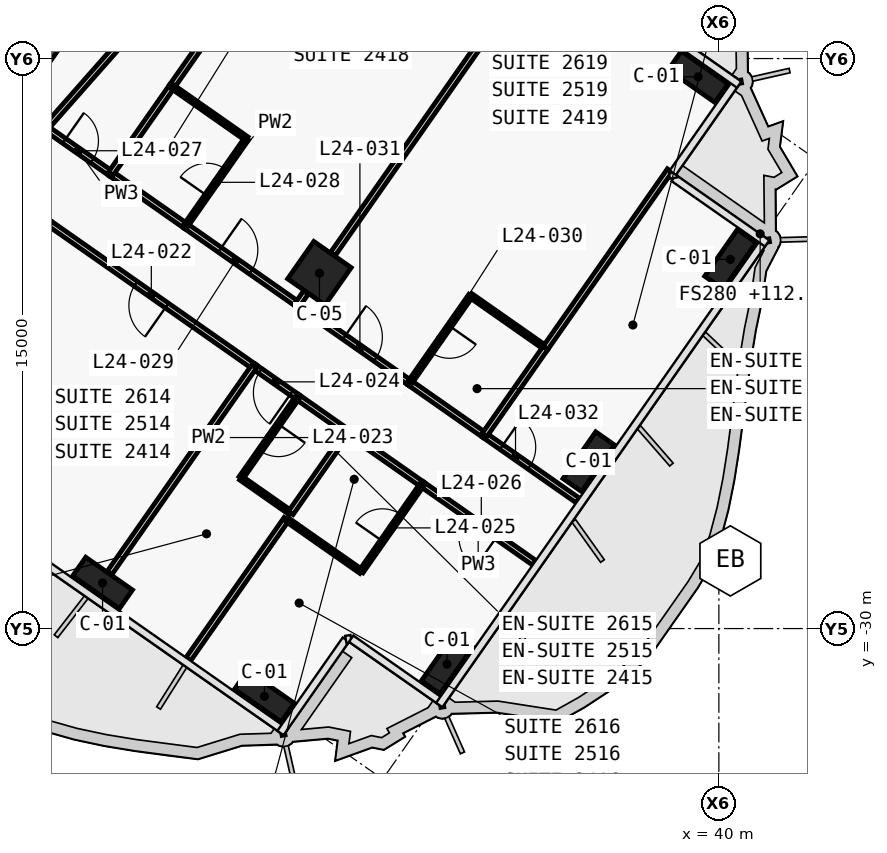
"""IFC4 building model, lengths in metres.
Left out: names, types, materials, properties, quantities, classifications, styles, units other than length and angle.
Written with IfcOpenShell. Run it as: python <this file> out.ifc"""

import sys

from ifc_helpers import new_model, si_unit, direction, frame, frame_2d, origin, origin_2d, place, context, subcontext, project, spatial, polyline, rectangle, outline, extrude, element, fill, save


model = new_model("IFC4")
c1 = context("Model", 3, precision=1e-05, world=origin(), true_north=direction((0.0, 1.0)))
c2 = subcontext(c1, "Body", "Model", "MODEL_VIEW")
j1 = project(units=[si_unit("LENGTHUNIT", "METRE"), si_unit("PLANEANGLEUNIT", "RADIAN")], contexts=[c1])
p1 = place(None, origin())
s1 = spatial("IfcSite", under=j1, at=p1, CompositionType="ELEMENT")
p2 = place(p1, origin())
s2 = spatial("IfcBuilding", under=s1, at=p2, CompositionType="ELEMENT")
p3 = place(p2, frame((0.0, 0.0, 112.1)))
s3 = spatial("IfcBuildingStorey", under=s2, at=p3, CompositionType="ELEMENT", Elevation=112.1)
p4 = place(p3, frame((21.708, -15.2, 0.0), z_axis=(0.0, 0.0, 1.0), x_axis=(0.573576324356, 0.819152122709, 0.0)))
e1 = element("IfcWall", 1, at=p4, inside=s3, PredefinedType="SHEAR", context=c2, shape_type="SweptSolid", body=[
    extrude(outline(polyline([(9.2, 0.5), (0.0, 0.5), (0.0, -0.5), (9.2, -0.5), (9.2, 0.5)])), origin(), (0.0, 0.0, 1.0), 3.6),
])
p5 = place(p4, frame((6.1, 0.0, 0.0)))
e2 = element("IfcOpeningElement", 2, at=p5, cuts=e1, PredefinedType="OPENING", context=c2, shape_type="SweptSolid", body=[
    extrude(rectangle(XDim=1.8, YDim=2.1, at=frame_2d((0.9, 1.05))), frame((0.0, 0.51, 0.0), z_axis=(0.0, -1.0, 0.0), x_axis=(1.0, 0.0, 0.0)), (0.0, 0.0, 1.0), 1.02),
])
p6 = place(p4, frame((1.9, 0.0, 0.0)))
e3 = element("IfcOpeningElement", 3, at=p6, cuts=e1, PredefinedType="OPENING", context=c2, shape_type="SweptSolid", body=[
    extrude(rectangle(XDim=1.8, YDim=2.1, at=frame_2d((0.9, 1.05))), frame((0.0, 0.51, 0.0), z_axis=(0.0, -1.0, 0.0), x_axis=(1.0, 0.0, 0.0)), (0.0, 0.0, 1.0), 1.02),
])
for number, where, z_axis, x_axis in (
    (4, (23.782, -28.799, 0.0), (0.0, 0.0, 1.0), (0.819, -0.574, 0.0)),
    (5, (28.042, -31.782, 0.0), (0.0, 0.0, 1.0), (0.819, -0.574, 0.0)),
    (6, (39.456, -15.481, 0.0), (0.0, 0.0, 1.0), (0.819, -0.574, 0.0)),
    (7, (32.847, -30.935, 0.0), (0.0, 0.0, 1.0), (0.574, 0.819, 0.0)),
    (8, (36.575, -25.61, 0.0), (0.0, 0.0, 1.0), (0.574, 0.819, 0.0)),
    (9, (40.303, -20.286, 0.0), (0.0, 0.0, 1.0), (0.574, 0.819, 0.0)),
):
    element("IfcColumn", number, at=place(p3, frame(where, z_axis=z_axis, x_axis=x_axis)), inside=s3, PredefinedType="COLUMN", context=c2, shape_type="SweptSolid", body=[
        extrude(rectangle(XDim=1.5, YDim=0.6, at=origin_2d()), origin(), (0.0, 0.0, 1.0), 3.6),
    ])
p7 = place(p3, frame((29.49, -20.649, 0.0), z_axis=(0.0, 0.0, 1.0), x_axis=(0.819152044289, -0.573576436351, 0.0)))
e10 = element("IfcColumn", 10, at=p7, inside=s3, PredefinedType="COLUMN", context=c2, shape_type="SweptSolid", body=[
    extrude(rectangle(XDim=1.2, YDim=1.2, at=origin_2d()), origin(), (0.0, 0.0, 1.0), 3.6),
])
p8 = place(p3, frame((22.284, -16.824, 0.0), z_axis=(0.0, 0.0, 1.0), x_axis=(0.819160859995, -0.573563846013, 0.0)))
e11 = element("IfcWall", 11, at=p8, inside=s3, PredefinedType="PARTITIONING", context=c2, shape_type="SweptSolid", body=[
    extrude(rectangle(XDim=2.098, YDim=0.15, at=frame_2d((1.049, 0.0))), origin(), (0.0, 0.0, 1.0), 3.32),
])
p9 = place(p8, frame((0.599, 0.0, 0.0)))
e12 = element("IfcOpeningElement", 12, at=p9, cuts=e11, PredefinedType="OPENING", context=c2, shape_type="SweptSolid", body=[
    extrude(rectangle(XDim=0.9, YDim=2.1, at=frame_2d((0.45, 1.05))), frame((0.0, 0.085, 0.0), z_axis=(0.0, -1.0, 0.0), x_axis=(1.0, 0.0, 0.0)), (0.0, 0.0, 1.0), 0.17),
])
p10 = place(p3, frame((25.966, -19.403, 0.0), z_axis=(0.0, 0.0, 1.0), x_axis=(0.81917779803, -0.57353965444, 0.0)))
e13 = element("IfcWall", 13, at=p10, inside=s3, PredefinedType="PARTITIONING", context=c2, shape_type="SweptSolid", body=[
    extrude(rectangle(XDim=3.603, YDim=0.15, at=frame_2d((1.801, 0.0))), origin(), (0.0, 0.0, 1.0), 2.6),
])
p11 = place(p10, frame((1.101, 0.0, 0.0)))
e14 = element("IfcOpeningElement", 14, at=p11, cuts=e13, PredefinedType="OPENING", context=c2, shape_type="SweptSolid", body=[
    extrude(rectangle(XDim=1.0, YDim=2.1, at=frame_2d((0.5, 1.05))), frame((0.0, 0.085, 0.0), z_axis=(0.0, -1.0, 0.0), x_axis=(1.0, 0.0, 0.0)), (0.0, 0.0, 1.0), 0.17),
])
p12 = place(p3, frame((23.999, -18.025, 0.0), z_axis=(0.0, 0.0, 1.0), x_axis=(0.819146032251, -0.573585022335, 0.0)))
e15 = element("IfcWall", 15, at=p12, inside=s3, PredefinedType="PARTITIONING", context=c2, shape_type="SweptSolid", body=[
    extrude(rectangle(XDim=2.404, YDim=0.15, at=frame_2d((1.202, 0.0))), origin(), (0.0, 0.0, 1.0), 3.32),
])
p13 = place(p3, frame((28.914, -21.467, 0.0), z_axis=(0.0, 0.0, 1.0), x_axis=(0.819145961204, -0.573585123798, 0.0)))
e16 = element("IfcWall", 16, at=p13, inside=s3, PredefinedType="PARTITIONING", context=c2, shape_type="SweptSolid", body=[
    extrude(rectangle(XDim=3.603, YDim=0.15, at=frame_2d((1.802, 0.0))), origin(), (0.0, 0.0, 1.0), 2.6),
])
p14 = place(p13, frame((1.502, 0.0, 0.0)))
e17 = element("IfcOpeningElement", 17, at=p14, cuts=e16, PredefinedType="OPENING", context=c2, shape_type="SweptSolid", body=[
    extrude(rectangle(XDim=1.0, YDim=2.1, at=frame_2d((0.5, 1.05))), frame((0.0, 0.085, 0.0), z_axis=(0.0, -1.0, 0.0), x_axis=(1.0, 0.0, 0.0)), (0.0, 0.0, 1.0), 0.17),
])
p15 = place(p3, frame((31.863, -23.531, 0.0), z_axis=(0.0, 0.0, 1.0), x_axis=(0.819146032251, -0.573585022335, 0.0)))
e18 = element("IfcWall", 18, at=p15, inside=s3, PredefinedType="PARTITIONING", context=c2, shape_type="SweptSolid", body=[
    extrude(rectangle(XDim=2.404, YDim=0.15, at=frame_2d((1.202, 0.0))), origin(), (0.0, 0.0, 1.0), 3.32),
])
p16 = place(p3, frame((33.829, -24.908, 0.0), z_axis=(0.0, 0.0, 1.0), x_axis=(0.81915932427, -0.57356603932, 0.0)))
e19 = element("IfcWall", 19, at=p16, inside=s3, PredefinedType="PARTITIONING", context=c2, shape_type="SweptSolid", body=[
    extrude(rectangle(XDim=3.002, YDim=0.15, at=frame_2d((1.501, 0.0))), origin(), (0.0, 0.0, 1.0), 2.5),
])
p17 = place(p16, frame((0.551, 0.0, 0.0)))
e20 = element("IfcOpeningElement", 20, at=p17, cuts=e19, PredefinedType="OPENING", context=c2, shape_type="SweptSolid", body=[
    extrude(rectangle(XDim=0.9, YDim=2.1, at=frame_2d((0.45, 1.05))), frame((0.0, 0.085, 0.0), z_axis=(0.0, -1.0, 0.0), x_axis=(1.0, 0.0, 0.0)), (0.0, 0.0, 1.0), 0.17),
])
p18 = place(p3, frame((27.771, -23.107, 0.0), z_axis=(0.0, 0.0, 1.0), x_axis=(-0.819153746897, 0.573574004767, 0.0)))
e21 = element("IfcWall", 21, at=p18, inside=s3, PredefinedType="PARTITIONING", context=c2, shape_type="SweptSolid", body=[
    extrude(rectangle(XDim=6.603, YDim=0.15, at=frame_2d((3.302, 0.0))), origin(), (0.0, 0.0, 1.0), 2.6),
])
p19 = place(p18, frame((2.802, 0.0, 0.0)))
e22 = element("IfcOpeningElement", 22, at=p19, cuts=e21, PredefinedType="OPENING", context=c2, shape_type="SweptSolid", body=[
    extrude(rectangle(XDim=1.0, YDim=2.1, at=frame_2d((0.5, 1.05))), frame((0.0, 0.085, 0.0), z_axis=(0.0, -1.0, 0.0), x_axis=(1.0, 0.0, 0.0)), (0.0, 0.0, 1.0), 0.17),
])
p20 = place(p3, frame((28.917, -23.91, 0.0), z_axis=(0.0, 0.0, 1.0), x_axis=(-0.819117471667, 0.573625808005, 0.0)))
e23 = element("IfcWall", 23, at=p20, inside=s3, PredefinedType="PARTITIONING", context=c2, shape_type="SweptSolid", body=[
    extrude(rectangle(XDim=1.403, YDim=0.15, at=frame_2d((0.702, 0.0))), origin(), (0.0, 0.0, 1.0), 2.6),
])
p21 = place(p20, frame((0.201, 0.0, 0.0)))
e24 = element("IfcOpeningElement", 24, at=p21, cuts=e23, PredefinedType="OPENING", context=c2, shape_type="SweptSolid", body=[
    extrude(rectangle(XDim=1.0, YDim=2.1, at=frame_2d((0.5, 1.05))), frame((0.0, 0.085, 0.0), z_axis=(0.0, -1.0, 0.0), x_axis=(1.0, 0.0, 0.0)), (0.0, 0.0, 1.0), 0.17),
])
p22 = place(p3, frame((30.228, -24.828, 0.0), z_axis=(0.0, 0.0, 1.0), x_axis=(-0.819189013667, 0.573523634986, 0.0)))
e25 = element("IfcWall", 25, at=p22, inside=s3, PredefinedType="PARTITIONING", context=c2, shape_type="SweptSolid", body=[
    extrude(rectangle(XDim=1.604, YDim=0.15, at=frame_2d((0.802, 0.0))), origin(), (0.0, 0.0, 1.0), 3.32),
])
p23 = place(p3, frame((35.141, -28.268, 0.0), z_axis=(0.0, 0.0, 1.0), x_axis=(-0.819149096931, 0.573580645591, 0.0)))
e26 = element("IfcWall", 26, at=p23, inside=s3, PredefinedType="PARTITIONING", context=c2, shape_type="SweptSolid", body=[
    extrude(rectangle(XDim=3.601, YDim=0.15, at=frame_2d((1.8, 0.0))), origin(), (0.0, 0.0, 1.0), 2.5),
])
p24 = place(p23, frame((1.2, 0.0, 0.0)))
e27 = element("IfcOpeningElement", 27, at=p24, cuts=e26, PredefinedType="OPENING", context=c2, shape_type="SweptSolid", body=[
    extrude(rectangle(XDim=1.0, YDim=2.1, at=frame_2d((0.5, 1.05))), frame((0.0, 0.085, 0.0), z_axis=(0.0, -1.0, 0.0), x_axis=(1.0, 0.0, 0.0)), (0.0, 0.0, 1.0), 0.17),
])
p25 = place(p3, frame((32.194, -26.205, 0.0), z_axis=(0.0, 0.0, 1.0), x_axis=(-0.819146032251, 0.573585022335, 0.0)))
e28 = element("IfcWall", 28, at=p25, inside=s3, PredefinedType="PARTITIONING", context=c2, shape_type="SweptSolid", body=[
    extrude(rectangle(XDim=2.404, YDim=0.15, at=frame_2d((1.202, 0.0))), origin(), (0.0, 0.0, 1.0), 3.32),
])
p26 = place(p3, frame((30.482, -8.77, 0.0), z_axis=(0.0, 0.0, 1.0), x_axis=(-0.573576058406, -0.819152308929, 0.0)))
e29 = element("IfcWall", 29, at=p26, inside=s3, PredefinedType="PARTITIONING", context=c2, shape_type="SweptSolid", body=[
    extrude(rectangle(XDim=8.501, YDim=0.15, at=frame_2d((4.25, 0.0))), origin(), (0.0, 0.0, 1.0), 2.6),
])
p27 = place(p3, frame((25.608, -15.731, 0.0), z_axis=(0.0, 0.0, 1.0), x_axis=(-0.573596837309, -0.819137759006, 0.0)))
e30 = element("IfcWall", 30, at=p27, inside=s3, PredefinedType="PARTITIONING", context=c2, shape_type="SweptSolid", body=[
    extrude(rectangle(XDim=2.802, YDim=0.15, at=frame_2d((1.401, 0.0))), origin(), (0.0, 0.0, 1.0), 2.6),
])
p28 = place(p3, frame((22.285, -16.825, 0.0), z_axis=(0.0, 0.0, 1.0), x_axis=(0.661551268245, 0.749899939647, 0.0)))
e31 = element("IfcWall", 31, at=p28, inside=s3, PredefinedType="PARTITIONING", context=c2, shape_type="SweptSolid", body=[
    extrude(rectangle(XDim=6.541, YDim=0.15, at=frame_2d((3.271, 0.0))), origin(), (0.0, 0.0, 1.0), 2.6),
])
p29 = place(p3, frame((25.968, -19.404, 0.0), z_axis=(0.0, 0.0, 1.0), x_axis=(0.573591086599, 0.819141785879, 0.0)))
e32 = element("IfcWall", 32, at=p29, inside=s3, PredefinedType="PARTITIONING", context=c2, shape_type="SweptSolid", body=[
    extrude(rectangle(XDim=2.8, YDim=0.12, at=frame_2d((1.4, 0.0))), origin(), (0.0, 0.0, 1.0), 2.6),
])
p30 = place(p29, frame((0.975, 0.0, 0.0)))
e33 = element("IfcOpeningElement", 33, at=p30, cuts=e32, PredefinedType="OPENING", context=c2, shape_type="SweptSolid", body=[
    extrude(rectangle(XDim=0.85, YDim=2.05, at=frame_2d((0.425, 1.025))), frame((0.0, 0.07, 0.0), z_axis=(0.0, -1.0, 0.0), x_axis=(1.0, 0.0, 0.0)), (0.0, 0.0, 1.0), 0.14),
])
p31 = place(p3, frame((27.573, -17.109, 0.0), z_axis=(0.0, 0.0, 1.0), x_axis=(-0.819107643868, 0.573639841501, 0.0)))
e34 = element("IfcWall", 34, at=p31, inside=s3, PredefinedType="PARTITIONING", context=c2, shape_type="SweptSolid", body=[
    extrude(rectangle(XDim=2.4, YDim=0.12, at=frame_2d((1.2, 0.0))), origin(), (0.0, 0.0, 1.0), 3.32),
])
p32 = place(p3, frame((35.013, -12.76, 0.0), z_axis=(0.0, 0.0, 1.0), x_axis=(-0.573558725113, -0.819164445546, 0.0)))
e35 = element("IfcWall", 35, at=p32, inside=s3, PredefinedType="PARTITIONING", context=c2, shape_type="SweptSolid", body=[
    extrude(rectangle(XDim=9.01, YDim=0.15, at=frame_2d((4.505, 0.0))), origin(), (0.0, 0.0, 1.0), 2.6),
])
p33 = place(p3, frame((29.134, -21.156, 0.0), z_axis=(0.0, 0.0, 1.0), x_axis=(-0.572944929411, -0.819593867633, 0.0)))
e36 = element("IfcWall", 36, at=p33, inside=s3, PredefinedType="PARTITIONING", context=c2, shape_type="SweptSolid", body=[
    extrude(rectangle(XDim=0.38, YDim=0.15, at=frame_2d((0.19, 0.0))), origin(), (0.0, 0.0, 1.0), 2.6),
])
p34 = place(p3, frame((35.438, -22.615, 0.0), z_axis=(0.0, 0.0, 1.0), x_axis=(-0.819141114317, 0.573592045652, 0.0)))
e37 = element("IfcWall", 37, at=p34, inside=s3, PredefinedType="PARTITIONING", context=c2, shape_type="SweptSolid", body=[
    extrude(rectangle(XDim=2.4, YDim=0.12, at=frame_2d((1.2, 0.0))), origin(), (0.0, 0.0, 1.0), 3.32),
])
p35 = place(p3, frame((33.47, -21.239, 0.0), z_axis=(0.0, 0.0, 1.0), x_axis=(-0.573550118428, -0.819170471667, 0.0)))
e38 = element("IfcWall", 38, at=p35, inside=s3, PredefinedType="PARTITIONING", context=c2, shape_type="SweptSolid", body=[
    extrude(rectangle(XDim=2.8, YDim=0.12, at=frame_2d((1.4, 0.0))), origin(), (0.0, 0.0, 1.0), 2.6),
])
p36 = place(p35, frame((0.975, 0.0, 0.0)))
e39 = element("IfcOpeningElement", 39, at=p36, cuts=e38, PredefinedType="OPENING", context=c2, shape_type="SweptSolid", body=[
    extrude(rectangle(XDim=0.85, YDim=2.05, at=frame_2d((0.425, 1.025))), frame((0.0, 0.07, 0.0), z_axis=(0.0, -1.0, 0.0), x_axis=(1.0, 0.0, 0.0)), (0.0, 0.0, 1.0), 0.14),
])
p37 = place(p3, frame((38.708, -17.945, 0.0), z_axis=(0.0, 0.0, 1.0), x_axis=(-0.573568678046, -0.819157476658, 0.0)))
e40 = element("IfcWall", 40, at=p37, inside=s3, PredefinedType="PARTITIONING", context=c2, shape_type="SweptSolid", body=[
    extrude(rectangle(XDim=5.701, YDim=0.15, at=frame_2d((2.851, 0.0))), origin(), (0.0, 0.0, 1.0), 3.32),
])
p38 = place(p3, frame((35.437, -22.616, 0.0), z_axis=(0.0, 0.0, 1.0), x_axis=(-0.573550118428, -0.819170471667, 0.0)))
e41 = element("IfcWall", 41, at=p38, inside=s3, PredefinedType="PARTITIONING", context=c2, shape_type="SweptSolid", body=[
    extrude(rectangle(XDim=2.8, YDim=0.15, at=frame_2d((1.4, 0.0))), origin(), (0.0, 0.0, 1.0), 2.6),
])
p39 = place(p3, frame((27.769, -23.106, 0.0), z_axis=(0.0, 0.0, 1.0), x_axis=(-0.57359826181, -0.819136761505, 0.0)))
e42 = element("IfcWall", 42, at=p39, inside=s3, PredefinedType="PARTITIONING", context=c2, shape_type="SweptSolid", body=[
    extrude(rectangle(XDim=6.63, YDim=0.15, at=frame_2d((3.315, 0.0))), origin(), (0.0, 0.0, 1.0), 2.6),
])
p40 = place(p3, frame((28.915, -23.909, 0.0), z_axis=(0.0, 0.0, 1.0), x_axis=(-0.573645091666, -0.819103967032, 0.0)))
e43 = element("IfcWall", 43, at=p40, inside=s3, PredefinedType="PARTITIONING", context=c2, shape_type="SweptSolid", body=[
    extrude(rectangle(XDim=2.6, YDim=0.12, at=frame_2d((1.3, 0.0))), origin(), (0.0, 0.0, 1.0), 3.32),
])
p41 = place(p40, frame((0.875, 0.0, 0.0)))
e44 = element("IfcOpeningElement", 44, at=p41, cuts=e43, PredefinedType="OPENING", context=c2, shape_type="SweptSolid", body=[
    extrude(rectangle(XDim=0.85, YDim=2.05, at=frame_2d((0.425, 1.025))), frame((0.0, 0.07, 0.0), z_axis=(0.0, -1.0, 0.0), x_axis=(1.0, 0.0, 0.0)), (0.0, 0.0, 1.0), 0.14),
])
p42 = place(p3, frame((27.424, -26.04, 0.0), z_axis=(0.0, 0.0, 1.0), x_axis=(0.81918174131, -0.573534022273, 0.0)))
e45 = element("IfcWall", 45, at=p42, inside=s3, PredefinedType="PARTITIONING", context=c2, shape_type="SweptSolid", body=[
    extrude(rectangle(XDim=1.6, YDim=0.12, at=frame_2d((0.8, 0.0))), origin(), (0.0, 0.0, 1.0), 3.32),
])
p43 = place(p3, frame((28.621, -27.12, 0.0), z_axis=(0.0, 0.0, 1.0), x_axis=(-0.573593387921, -0.81914017441, 0.0)))
e46 = element("IfcWall", 46, at=p43, inside=s3, PredefinedType="PARTITIONING", context=c2, shape_type="SweptSolid", body=[
    extrude(rectangle(XDim=4.501, YDim=0.15, at=frame_2d((2.25, 0.0))), origin(), (0.0, 0.0, 1.0), 2.5),
])
p44 = place(p3, frame((30.226, -24.827, 0.0), z_axis=(0.0, 0.0, 1.0), x_axis=(-0.573600972199, -0.819134863556, 0.0)))
e47 = element("IfcWall", 47, at=p44, inside=s3, PredefinedType="PARTITIONING", context=c2, shape_type="SweptSolid", body=[
    extrude(rectangle(XDim=2.6, YDim=0.15, at=frame_2d((1.3, 0.0))), origin(), (0.0, 0.0, 1.0), 3.32),
])
p45 = place(p3, frame((28.62, -27.121, 0.0), z_axis=(0.0, 0.0, 1.0), x_axis=(0.819141114317, -0.573592045652, 0.0)))
e48 = element("IfcWall", 48, at=p45, inside=s3, PredefinedType="PARTITIONING", context=c2, shape_type="SweptSolid", body=[
    extrude(rectangle(XDim=2.4, YDim=0.12, at=frame_2d((1.2, 0.0))), origin(), (0.0, 0.0, 1.0), 3.32),
])
p46 = place(p3, frame((30.587, -28.498, 0.0), z_axis=(0.0, 0.0, 1.0), x_axis=(0.573608623498, 0.819129505664, 0.0)))
e49 = element("IfcWall", 49, at=p46, inside=s3, PredefinedType="PARTITIONING", context=c2, shape_type="SweptSolid", body=[
    extrude(rectangle(XDim=2.8, YDim=0.12, at=frame_2d((1.4, 0.0))), origin(), (0.0, 0.0, 1.0), 3.32),
])
p47 = place(p46, frame((0.975, 0.0, 0.0)))
e50 = element("IfcOpeningElement", 50, at=p47, cuts=e49, PredefinedType="OPENING", context=c2, shape_type="SweptSolid", body=[
    extrude(rectangle(XDim=0.85, YDim=2.05, at=frame_2d((0.425, 1.025))), frame((0.0, 0.07, 0.0), z_axis=(0.0, -1.0, 0.0), x_axis=(1.0, 0.0, 0.0)), (0.0, 0.0, 1.0), 0.14),
])
p48 = place(p19, origin())
e51 = element("IfcDoor", 51, at=p48, inside=s3, OperationType="SINGLE_SWING_LEFT", PredefinedType="DOOR", context=c2, shape_type="SweptSolid", body=[
    extrude(rectangle(XDim=1.0, YDim=2.1, at=frame_2d((0.5, 1.05))), frame((0.0, 0.025, 0.0), z_axis=(0.0, -1.0, 0.0), x_axis=(1.0, 0.0, 0.0)), (0.0, 0.0, 1.0), 0.05),
])
fill(e22, e51)
p49 = place(p41, origin())
e52 = element("IfcDoor", 52, at=p49, inside=s3, OperationType="SINGLE_SWING_RIGHT", PredefinedType="DOOR", context=c2, shape_type="SweptSolid", body=[
    extrude(rectangle(XDim=0.85, YDim=2.05, at=frame_2d((0.425, 1.025))), frame((0.0, 0.025, 0.0), z_axis=(0.0, -1.0, 0.0), x_axis=(1.0, 0.0, 0.0)), (0.0, 0.0, 1.0), 0.05),
])
fill(e44, e52)
p50 = place(p21, origin())
e53 = element("IfcDoor", 53, at=p50, inside=s3, OperationType="SINGLE_SWING_LEFT", PredefinedType="DOOR", context=c2, shape_type="SweptSolid", body=[
    extrude(rectangle(XDim=1.0, YDim=2.1, at=frame_2d((0.5, 1.05))), frame((0.0, 0.025, 0.0), z_axis=(0.0, -1.0, 0.0), x_axis=(1.0, 0.0, 0.0)), (0.0, 0.0, 1.0), 0.05),
])
fill(e24, e53)
p51 = place(p47, origin())
e54 = element("IfcDoor", 54, at=p51, inside=s3, OperationType="SINGLE_SWING_LEFT", PredefinedType="DOOR", context=c2, shape_type="SweptSolid", body=[
    extrude(rectangle(XDim=0.85, YDim=2.05, at=frame_2d((0.425, 1.025))), frame((0.0, 0.025, 0.0), z_axis=(0.0, -1.0, 0.0), x_axis=(1.0, 0.0, 0.0)), (0.0, 0.0, 1.0), 0.05),
])
fill(e50, e54)
p52 = place(p24, origin())
e55 = element("IfcDoor", 55, at=p52, inside=s3, OperationType="SINGLE_SWING_LEFT", PredefinedType="DOOR", context=c2, shape_type="SweptSolid", body=[
    extrude(rectangle(XDim=1.0, YDim=2.1, at=frame_2d((0.5, 1.05))), frame((0.0, 0.025, 0.0), z_axis=(0.0, -1.0, 0.0), x_axis=(1.0, 0.0, 0.0)), (0.0, 0.0, 1.0), 0.05),
])
fill(e27, e55)
p53 = place(p9, origin())
e56 = element("IfcDoor", 56, at=p53, inside=s3, OperationType="SINGLE_SWING_LEFT", PredefinedType="DOOR", context=c2, shape_type="SweptSolid", body=[
    extrude(rectangle(XDim=0.9, YDim=2.1, at=frame_2d((0.45, 1.05))), frame((0.0, 0.025, 0.0), z_axis=(0.0, -1.0, 0.0), x_axis=(1.0, 0.0, 0.0)), (0.0, 0.0, 1.0), 0.05),
])
fill(e12, e56)
p54 = place(p30, origin())
e57 = element("IfcDoor", 57, at=p54, inside=s3, OperationType="SINGLE_SWING_RIGHT", PredefinedType="DOOR", context=c2, shape_type="SweptSolid", body=[
    extrude(rectangle(XDim=0.85, YDim=2.05, at=frame_2d((0.425, 1.025))), frame((0.0, 0.025, 0.0), z_axis=(0.0, -1.0, 0.0), x_axis=(1.0, 0.0, 0.0)), (0.0, 0.0, 1.0), 0.05),
])
fill(e33, e57)
p55 = place(p11, origin())
e58 = element("IfcDoor", 58, at=p55, inside=s3, OperationType="SINGLE_SWING_LEFT", PredefinedType="DOOR", context=c2, shape_type="SweptSolid", body=[
    extrude(rectangle(XDim=1.0, YDim=2.1, at=frame_2d((0.5, 1.05))), frame((0.0, 0.025, 0.0), z_axis=(0.0, -1.0, 0.0), x_axis=(1.0, 0.0, 0.0)), (0.0, 0.0, 1.0), 0.05),
])
fill(e14, e58)
p56 = place(p36, origin())
e59 = element("IfcDoor", 59, at=p56, inside=s3, OperationType="SINGLE_SWING_RIGHT", PredefinedType="DOOR", context=c2, shape_type="SweptSolid", body=[
    extrude(rectangle(XDim=0.85, YDim=2.05, at=frame_2d((0.425, 1.025))), frame((0.0, 0.025, 0.0), z_axis=(0.0, -1.0, 0.0), x_axis=(1.0, 0.0, 0.0)), (0.0, 0.0, 1.0), 0.05),
])
fill(e39, e59)
p57 = place(p14, origin())
e60 = element("IfcDoor", 60, at=p57, inside=s3, OperationType="SINGLE_SWING_LEFT", PredefinedType="DOOR", context=c2, shape_type="SweptSolid", body=[
    extrude(rectangle(XDim=1.0, YDim=2.1, at=frame_2d((0.5, 1.05))), frame((0.0, 0.025, 0.0), z_axis=(0.0, -1.0, 0.0), x_axis=(1.0, 0.0, 0.0)), (0.0, 0.0, 1.0), 0.05),
])
fill(e17, e60)
p58 = place(p17, origin())
e61 = element("IfcDoor", 61, at=p58, inside=s3, OperationType="SINGLE_SWING_RIGHT", PredefinedType="DOOR", context=c2, shape_type="SweptSolid", body=[
    extrude(rectangle(XDim=0.9, YDim=2.1, at=frame_2d((0.45, 1.05))), frame((0.0, 0.025, 0.0), z_axis=(0.0, -1.0, 0.0), x_axis=(1.0, 0.0, 0.0)), (0.0, 0.0, 1.0), 0.05),
])
fill(e20, e61)
save(model, sys.argv[1])
